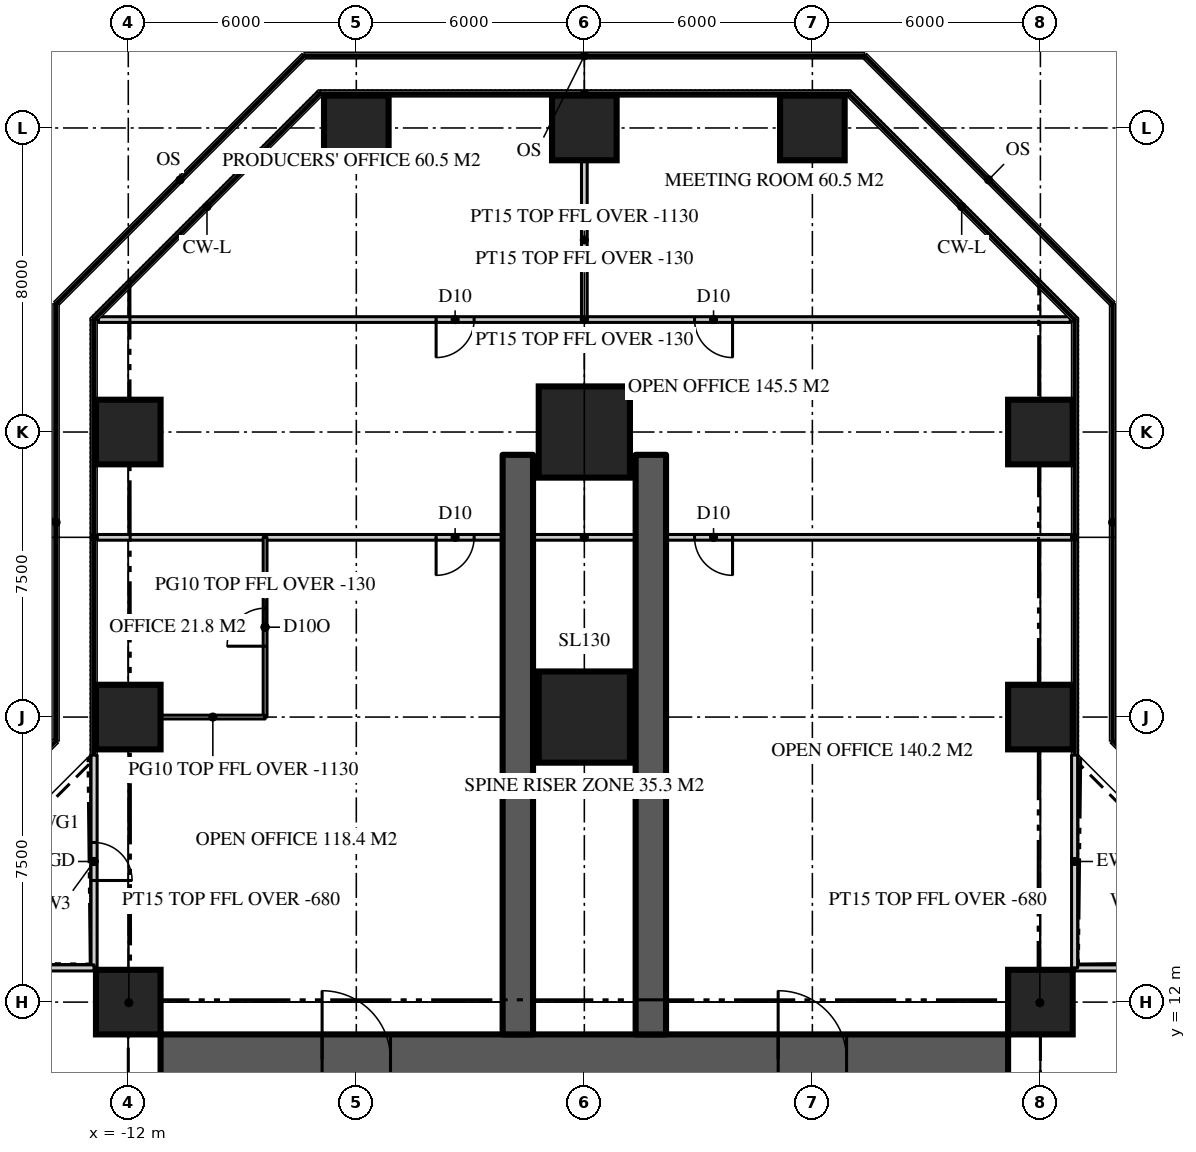
"""IFC4 building model, lengths in metres.
Left out: names, types, materials, properties, quantities, classifications, styles, units other than length and angle.
Written with IfcOpenShell. Run it as: python <this file> out.ifc"""

import sys

from ifc_helpers import new_model, si_unit, direction, frame, frame_2d, origin, origin_2d, place, context, subcontext, project, spatial, rectangle, extrude, element, fill, save


model = new_model("IFC4")
c1 = context("Model", 3, precision=1e-05, world=origin(), true_north=direction((0.0, 1.0)))
c2 = subcontext(c1, "Body", "Model", "MODEL_VIEW")
j1 = project(units=[si_unit("LENGTHUNIT", "METRE"), si_unit("PLANEANGLEUNIT", "RADIAN")], contexts=[c1])
p1 = place(None, origin())
s1 = spatial("IfcSite", under=j1, at=p1, CompositionType="ELEMENT")
p2 = place(p1, origin())
s2 = spatial("IfcBuilding", under=s1, at=p2, CompositionType="ELEMENT")
p3 = place(p2, frame((0.0, 0.0, 51.3)))
s3 = spatial("IfcBuildingStorey", under=s2, at=p3, CompositionType="ELEMENT", Elevation=51.3)
p4 = place(p3, frame((-11.15, 10.5, 0.0), z_axis=(0.0, 0.0, 1.0), x_axis=(1.0, 0.0, 0.0)))
e1 = element("IfcWall", 1, at=p4, inside=s3, PredefinedType="SHEAR", context=c2, shape_type="SweptSolid", body=[
    extrude(rectangle(XDim=22.3, YDim=1.3, at=frame_2d((11.15, 0.0))), origin(), (0.0, 0.0, 1.0), 3.9),
])
p5 = place(p4, frame((4.25, 0.0, 0.0)))
e2 = element("IfcOpeningElement", 2, at=p5, cuts=e1, PredefinedType="OPENING", context=c2, shape_type="SweptSolid", body=[
    extrude(rectangle(XDim=1.8, YDim=2.2, at=frame_2d((0.9, 1.1))), frame((0.0, 0.66, 0.0), z_axis=(0.0, -1.0, 0.0), x_axis=(1.0, 0.0, 0.0)), (0.0, 0.0, 1.0), 1.32),
])
p6 = place(p4, frame((16.25, 0.0, 0.0)))
e3 = element("IfcOpeningElement", 3, at=p6, cuts=e1, PredefinedType="OPENING", context=c2, shape_type="SweptSolid", body=[
    extrude(rectangle(XDim=1.8, YDim=2.2, at=frame_2d((0.9, 1.1))), frame((0.0, 0.66, 0.0), z_axis=(0.0, -1.0, 0.0), x_axis=(1.0, 0.0, 0.0)), (0.0, 0.0, 1.0), 1.32),
])
for number, where, z_axis, x_axis in (
    (4, (1.75, 11.15, 0.0), (0.0, 0.0, 1.0), (0.0, 1.0, 0.0)),
    (5, (-1.75, 11.15, 0.0), (0.0, 0.0, 1.0), (0.0, 1.0, 0.0)),
):
    element("IfcWall", number, at=place(p3, frame(where, z_axis=z_axis, x_axis=x_axis)), inside=s3, PredefinedType="SHEAR", context=c2, shape_type="SweptSolid", body=[
        extrude(rectangle(XDim=15.25, YDim=0.8, at=frame_2d((7.625, 0.0))), origin(), (0.0, 0.0, 1.0), 3.9),
    ])
for number, where, z_axis, x_axis in (
    (6, (-12.0, 12.0, 0.0), (0.0, 0.0, 1.0), (1.0, 0.0, 0.0)),
    (7, (12.0, 12.0, 0.0), (0.0, 0.0, 1.0), (1.0, 0.0, 0.0)),
    (8, (-12.0, 19.5, 0.0), (0.0, 0.0, 1.0), (1.0, 0.0, 0.0)),
):
    element("IfcColumn", number, at=place(p3, frame(where, z_axis=z_axis, x_axis=x_axis)), inside=s3, PredefinedType="COLUMN", context=c2, shape_type="SweptSolid", body=[
        extrude(rectangle(XDim=1.7, YDim=1.7, at=origin_2d()), origin(), (0.0, 0.0, 1.0), 3.9),
    ])
p7 = place(p3, frame((0.0, 19.5, 0.0), z_axis=(0.0, 0.0, 1.0), x_axis=(1.0, 0.0, 0.0)))
e9 = element("IfcColumn", 9, at=p7, inside=s3, PredefinedType="COLUMN", context=c2, shape_type="SweptSolid", body=[
    extrude(rectangle(XDim=2.4, YDim=2.4, at=origin_2d()), origin(), (0.0, 0.0, 1.0), 3.9),
])
for number, where, z_axis, x_axis in (
    (10, (12.0, 19.5, 0.0), (0.0, 0.0, 1.0), (1.0, 0.0, 0.0)),
    (11, (-12.0, 27.0, 0.0), (0.0, 0.0, 1.0), (1.0, 0.0, 0.0)),
):
    element("IfcColumn", number, at=place(p3, frame(where, z_axis=z_axis, x_axis=x_axis)), inside=s3, PredefinedType="COLUMN", context=c2, shape_type="SweptSolid", body=[
        extrude(rectangle(XDim=1.7, YDim=1.7, at=origin_2d()), origin(), (0.0, 0.0, 1.0), 3.9),
    ])
p8 = place(p3, frame((0.0, 27.0, 0.0), z_axis=(0.0, 0.0, 1.0), x_axis=(1.0, 0.0, 0.0)))
e12 = element("IfcColumn", 12, at=p8, inside=s3, PredefinedType="COLUMN", context=c2, shape_type="SweptSolid", body=[
    extrude(rectangle(XDim=2.4, YDim=2.4, at=origin_2d()), origin(), (0.0, 0.0, 1.0), 3.9),
])
for number, where, z_axis, x_axis in (
    (13, (12.0, 27.0, 0.0), (0.0, 0.0, 1.0), (1.0, 0.0, 0.0)),
    (14, (-6.0, 35.0, 0.0), (0.0, 0.0, 1.0), (1.0, 0.0, 0.0)),
    (15, (0.0, 35.0, 0.0), (0.0, 0.0, 1.0), (1.0, 0.0, 0.0)),
    (16, (6.0, 35.0, 0.0), (0.0, 0.0, 1.0), (1.0, 0.0, 0.0)),
):
    element("IfcColumn", number, at=place(p3, frame(where, z_axis=z_axis, x_axis=x_axis)), inside=s3, PredefinedType="COLUMN", context=c2, shape_type="SweptSolid", body=[
        extrude(rectangle(XDim=1.7, YDim=1.7, at=origin_2d()), origin(), (0.0, 0.0, 1.0), 3.9),
    ])
p9 = place(p3, frame((18.5, 12.9, 0.0), z_axis=(0.0, 0.0, 1.0), x_axis=(-1.0, 0.0, 0.0)))
e17 = element("IfcWall", 17, at=p9, inside=s3, PredefinedType="SOLIDWALL", context=c2, shape_type="SweptSolid", body=[
    extrude(rectangle(XDim=5.6, YDim=0.16, at=frame_2d((2.8, 0.0))), origin(), (0.0, 0.0, 1.0), 3.77),
])
p10 = place(p9, frame((2.3, 0.0, 0.0)))
e18 = element("IfcOpeningElement", 18, at=p10, cuts=e17, PredefinedType="OPENING", context=c2, shape_type="SweptSolid", body=[
    extrude(rectangle(XDim=1.0, YDim=2.2, at=frame_2d((0.5, 1.1))), frame((0.0, 0.09, 0.0), z_axis=(0.0, -1.0, 0.0), x_axis=(1.0, 0.0, 0.0)), (0.0, 0.0, 1.0), 0.18),
])
p11 = place(p3, frame((12.9, 12.9, 0.0), z_axis=(0.0, 0.0, 1.0), x_axis=(0.0, 1.0, 0.0)))
e19 = element("IfcWall", 19, at=p11, inside=s3, PredefinedType="SOLIDWALL", context=c2, shape_type="SweptSolid", body=[
    extrude(rectangle(XDim=5.6, YDim=0.16, at=frame_2d((2.8, 0.0))), origin(), (0.0, 0.0, 1.0), 3.77),
])
p12 = place(p3, frame((-12.9, 18.5, 0.0), z_axis=(0.0, 0.0, 1.0), x_axis=(0.0, -1.0, 0.0)))
e20 = element("IfcWall", 20, at=p12, inside=s3, PredefinedType="SOLIDWALL", context=c2, shape_type="SweptSolid", body=[
    extrude(rectangle(XDim=5.6, YDim=0.16, at=frame_2d((2.8, 0.0))), origin(), (0.0, 0.0, 1.0), 3.77),
])
p13 = place(p12, frame((2.3, 0.0, 0.0)))
e21 = element("IfcOpeningElement", 21, at=p13, cuts=e20, PredefinedType="OPENING", context=c2, shape_type="SweptSolid", body=[
    extrude(rectangle(XDim=1.0, YDim=2.2, at=frame_2d((0.5, 1.1))), frame((0.0, 0.09, 0.0), z_axis=(0.0, -1.0, 0.0), x_axis=(1.0, 0.0, 0.0)), (0.0, 0.0, 1.0), 0.18),
])
p14 = place(p3, frame((-12.9, 12.9, 0.0), z_axis=(0.0, 0.0, 1.0), x_axis=(-1.0, 0.0, 0.0)))
e22 = element("IfcWall", 22, at=p14, inside=s3, PredefinedType="SOLIDWALL", context=c2, shape_type="SweptSolid", body=[
    extrude(rectangle(XDim=5.6, YDim=0.16, at=frame_2d((2.8, 0.0))), origin(), (0.0, 0.0, 1.0), 3.77),
])
p15 = place(p3, frame((12.82, 24.229, 0.0), z_axis=(0.0, 0.0, 1.0), x_axis=(-1.0, 0.0, 0.0)))
e23 = element("IfcWall", 23, at=p15, inside=s3, PredefinedType="PARTITIONING", context=c2, shape_type="SweptSolid", body=[
    extrude(rectangle(XDim=25.64, YDim=0.15, at=frame_2d((12.82, 0.0))), origin(), (0.0, 0.0, 1.0), 3.77),
])
p16 = place(p15, frame((15.72, 0.0, 0.0)))
e24 = element("IfcOpeningElement", 24, at=p16, cuts=e23, PredefinedType="OPENING", context=c2, shape_type="SweptSolid", body=[
    extrude(rectangle(XDim=1.0, YDim=2.2, at=frame_2d((0.5, 1.1))), frame((0.0, 0.085, 0.0), z_axis=(0.0, -1.0, 0.0), x_axis=(1.0, 0.0, 0.0)), (0.0, 0.0, 1.0), 0.17),
])
p17 = place(p15, frame((8.92, 0.0, 0.0)))
e25 = element("IfcOpeningElement", 25, at=p17, cuts=e23, PredefinedType="OPENING", context=c2, shape_type="SweptSolid", body=[
    extrude(rectangle(XDim=1.0, YDim=2.2, at=frame_2d((0.5, 1.1))), frame((0.0, 0.085, 0.0), z_axis=(0.0, -1.0, 0.0), x_axis=(1.0, 0.0, 0.0)), (0.0, 0.0, 1.0), 0.17),
])
p18 = place(p3, frame((12.786, 29.959, 0.0), z_axis=(0.0, 0.0, 1.0), x_axis=(-1.0, 0.0, 0.0)))
e26 = element("IfcWall", 26, at=p18, inside=s3, PredefinedType="PARTITIONING", context=c2, shape_type="SweptSolid", body=[
    extrude(rectangle(XDim=25.573, YDim=0.15, at=frame_2d((12.786, 0.0))), origin(), (0.0, 0.0, 1.0), 3.77),
])
p19 = place(p18, frame((15.687, 0.0, 0.0)))
e27 = element("IfcOpeningElement", 27, at=p19, cuts=e26, PredefinedType="OPENING", context=c2, shape_type="SweptSolid", body=[
    extrude(rectangle(XDim=1.0, YDim=2.2, at=frame_2d((0.5, 1.1))), frame((0.0, 0.085, 0.0), z_axis=(0.0, -1.0, 0.0), x_axis=(1.0, 0.0, 0.0)), (0.0, 0.0, 1.0), 0.17),
])
p20 = place(p18, frame((8.886, 0.0, 0.0)))
e28 = element("IfcOpeningElement", 28, at=p20, cuts=e26, PredefinedType="OPENING", context=c2, shape_type="SweptSolid", body=[
    extrude(rectangle(XDim=1.0, YDim=2.2, at=frame_2d((0.5, 1.1))), frame((0.0, 0.085, 0.0), z_axis=(0.0, -1.0, 0.0), x_axis=(1.0, 0.0, 0.0)), (0.0, 0.0, 1.0), 0.17),
])
p21 = place(p3, frame((0.0, 29.959, 0.0), z_axis=(0.0, 0.0, 1.0), x_axis=(0.0, 1.0, 0.0)))
e29 = element("IfcWall", 29, at=p21, inside=s3, PredefinedType="PARTITIONING", context=c2, shape_type="SweptSolid", body=[
    extrude(rectangle(XDim=4.191, YDim=0.15, at=frame_2d((2.095, 0.0))), origin(), (0.0, 0.0, 1.0), 2.77),
])
p22 = place(p3, frame((-8.4, 19.5, 0.0), z_axis=(0.0, 0.0, 1.0), x_axis=(0.0, 1.0, 0.0)))
e30 = element("IfcWall", 30, at=p22, inside=s3, PredefinedType="PARTITIONING", context=c2, shape_type="SweptSolid", body=[
    extrude(rectangle(XDim=4.729, YDim=0.1, at=frame_2d((2.365, 0.0))), origin(), (0.0, 0.0, 1.0), 3.77),
])
p23 = place(p22, frame((1.865, 0.0, 0.0)))
e31 = element("IfcOpeningElement", 31, at=p23, cuts=e30, PredefinedType="OPENING", context=c2, shape_type="SweptSolid", body=[
    extrude(rectangle(XDim=1.0, YDim=2.2, at=frame_2d((0.5, 1.1))), frame((0.0, 0.06, 0.0), z_axis=(0.0, -1.0, 0.0), x_axis=(1.0, 0.0, 0.0)), (0.0, 0.0, 1.0), 0.12),
])
p24 = place(p3, frame((-8.4, 19.5, 0.0), z_axis=(0.0, 0.0, 1.0), x_axis=(-1.0, 0.0, 0.0)))
e32 = element("IfcWall", 32, at=p24, inside=s3, PredefinedType="PARTITIONING", context=c2, shape_type="SweptSolid", body=[
    extrude(rectangle(XDim=2.75, YDim=0.1, at=frame_2d((1.375, 0.0))), origin(), (0.0, 0.0, 1.0), 2.77),
])
for number, where, z_axis, x_axis in (
    (33, (11.15, 11.15, 0.0), (0.0, 0.0, 1.0), (0.707, 0.707, 0.0)),
    (34, (-11.15, 11.15, 0.0), (0.0, 0.0, 1.0), (-0.707, 0.707, 0.0)),
):
    element("IfcWall", number, at=place(p3, frame(where, z_axis=z_axis, x_axis=x_axis)), inside=s3, PredefinedType="PARTITIONING", context=c2, shape_type="SweptSolid", body=[
        extrude(rectangle(XDim=2.362, YDim=0.15, at=frame_2d((1.181, 0.0))), origin(), (0.0, 0.0, 1.0), 3.22),
    ])
p25 = place(p13, origin())
e35 = element("IfcDoor", 35, at=p25, inside=s3, OperationType="SINGLE_SWING_RIGHT", PredefinedType="DOOR", context=c2, shape_type="SweptSolid", body=[
    extrude(rectangle(XDim=1.0, YDim=2.2, at=frame_2d((0.5, 1.1))), frame((0.0, 0.025, 0.0), z_axis=(0.0, -1.0, 0.0), x_axis=(1.0, 0.0, 0.0)), (0.0, 0.0, 1.0), 0.05),
])
fill(e21, e35)
p26 = place(p5, origin())
e36 = element("IfcDoor", 36, at=p26, inside=s3, OperationType="DOUBLE_DOOR_DOUBLE_SWING", PredefinedType="DOOR", context=c2, shape_type="SweptSolid", body=[
    extrude(rectangle(XDim=1.8, YDim=2.2, at=frame_2d((0.9, 1.1))), frame((0.0, 0.025, 0.0), z_axis=(0.0, -1.0, 0.0), x_axis=(1.0, 0.0, 0.0)), (0.0, 0.0, 1.0), 0.05),
])
fill(e2, e36)
p27 = place(p6, origin())
e37 = element("IfcDoor", 37, at=p27, inside=s3, OperationType="DOUBLE_DOOR_DOUBLE_SWING", PredefinedType="DOOR", context=c2, shape_type="SweptSolid", body=[
    extrude(rectangle(XDim=1.8, YDim=2.2, at=frame_2d((0.9, 1.1))), frame((0.0, 0.025, 0.0), z_axis=(0.0, -1.0, 0.0), x_axis=(1.0, 0.0, 0.0)), (0.0, 0.0, 1.0), 0.05),
])
fill(e3, e37)
p28 = place(p16, origin())
e38 = element("IfcDoor", 38, at=p28, inside=s3, OperationType="SINGLE_SWING_RIGHT", PredefinedType="DOOR", context=c2, shape_type="SweptSolid", body=[
    extrude(rectangle(XDim=1.0, YDim=2.2, at=frame_2d((0.5, 1.1))), frame((0.0, 0.025, 0.0), z_axis=(0.0, -1.0, 0.0), x_axis=(1.0, 0.0, 0.0)), (0.0, 0.0, 1.0), 0.05),
])
fill(e24, e38)
p29 = place(p17, origin())
e39 = element("IfcDoor", 39, at=p29, inside=s3, OperationType="SINGLE_SWING_LEFT", PredefinedType="DOOR", context=c2, shape_type="SweptSolid", body=[
    extrude(rectangle(XDim=1.0, YDim=2.2, at=frame_2d((0.5, 1.1))), frame((0.0, 0.025, 0.0), z_axis=(0.0, -1.0, 0.0), x_axis=(1.0, 0.0, 0.0)), (0.0, 0.0, 1.0), 0.05),
])
fill(e25, e39)
p30 = place(p19, origin())
e40 = element("IfcDoor", 40, at=p30, inside=s3, OperationType="SINGLE_SWING_RIGHT", PredefinedType="DOOR", context=c2, shape_type="SweptSolid", body=[
    extrude(rectangle(XDim=1.0, YDim=2.2, at=frame_2d((0.5, 1.1))), frame((0.0, 0.025, 0.0), z_axis=(0.0, -1.0, 0.0), x_axis=(1.0, 0.0, 0.0)), (0.0, 0.0, 1.0), 0.05),
])
fill(e27, e40)
p31 = place(p20, origin())
e41 = element("IfcDoor", 41, at=p31, inside=s3, OperationType="SINGLE_SWING_LEFT", PredefinedType="DOOR", context=c2, shape_type="SweptSolid", body=[
    extrude(rectangle(XDim=1.0, YDim=2.2, at=frame_2d((0.5, 1.1))), frame((0.0, 0.025, 0.0), z_axis=(0.0, -1.0, 0.0), x_axis=(1.0, 0.0, 0.0)), (0.0, 0.0, 1.0), 0.05),
])
fill(e28, e41)
p32 = place(p23, origin())
e42 = element("IfcDoor", 42, at=p32, inside=s3, OperationType="SINGLE_SWING_LEFT", PredefinedType="DOOR", context=c2, shape_type="SweptSolid", body=[
    extrude(rectangle(XDim=1.0, YDim=2.2, at=frame_2d((0.5, 1.1))), frame((0.0, 0.025, 0.0), z_axis=(0.0, -1.0, 0.0), x_axis=(1.0, 0.0, 0.0)), (0.0, 0.0, 1.0), 0.05),
])
fill(e31, e42)
save(model, sys.argv[1])
